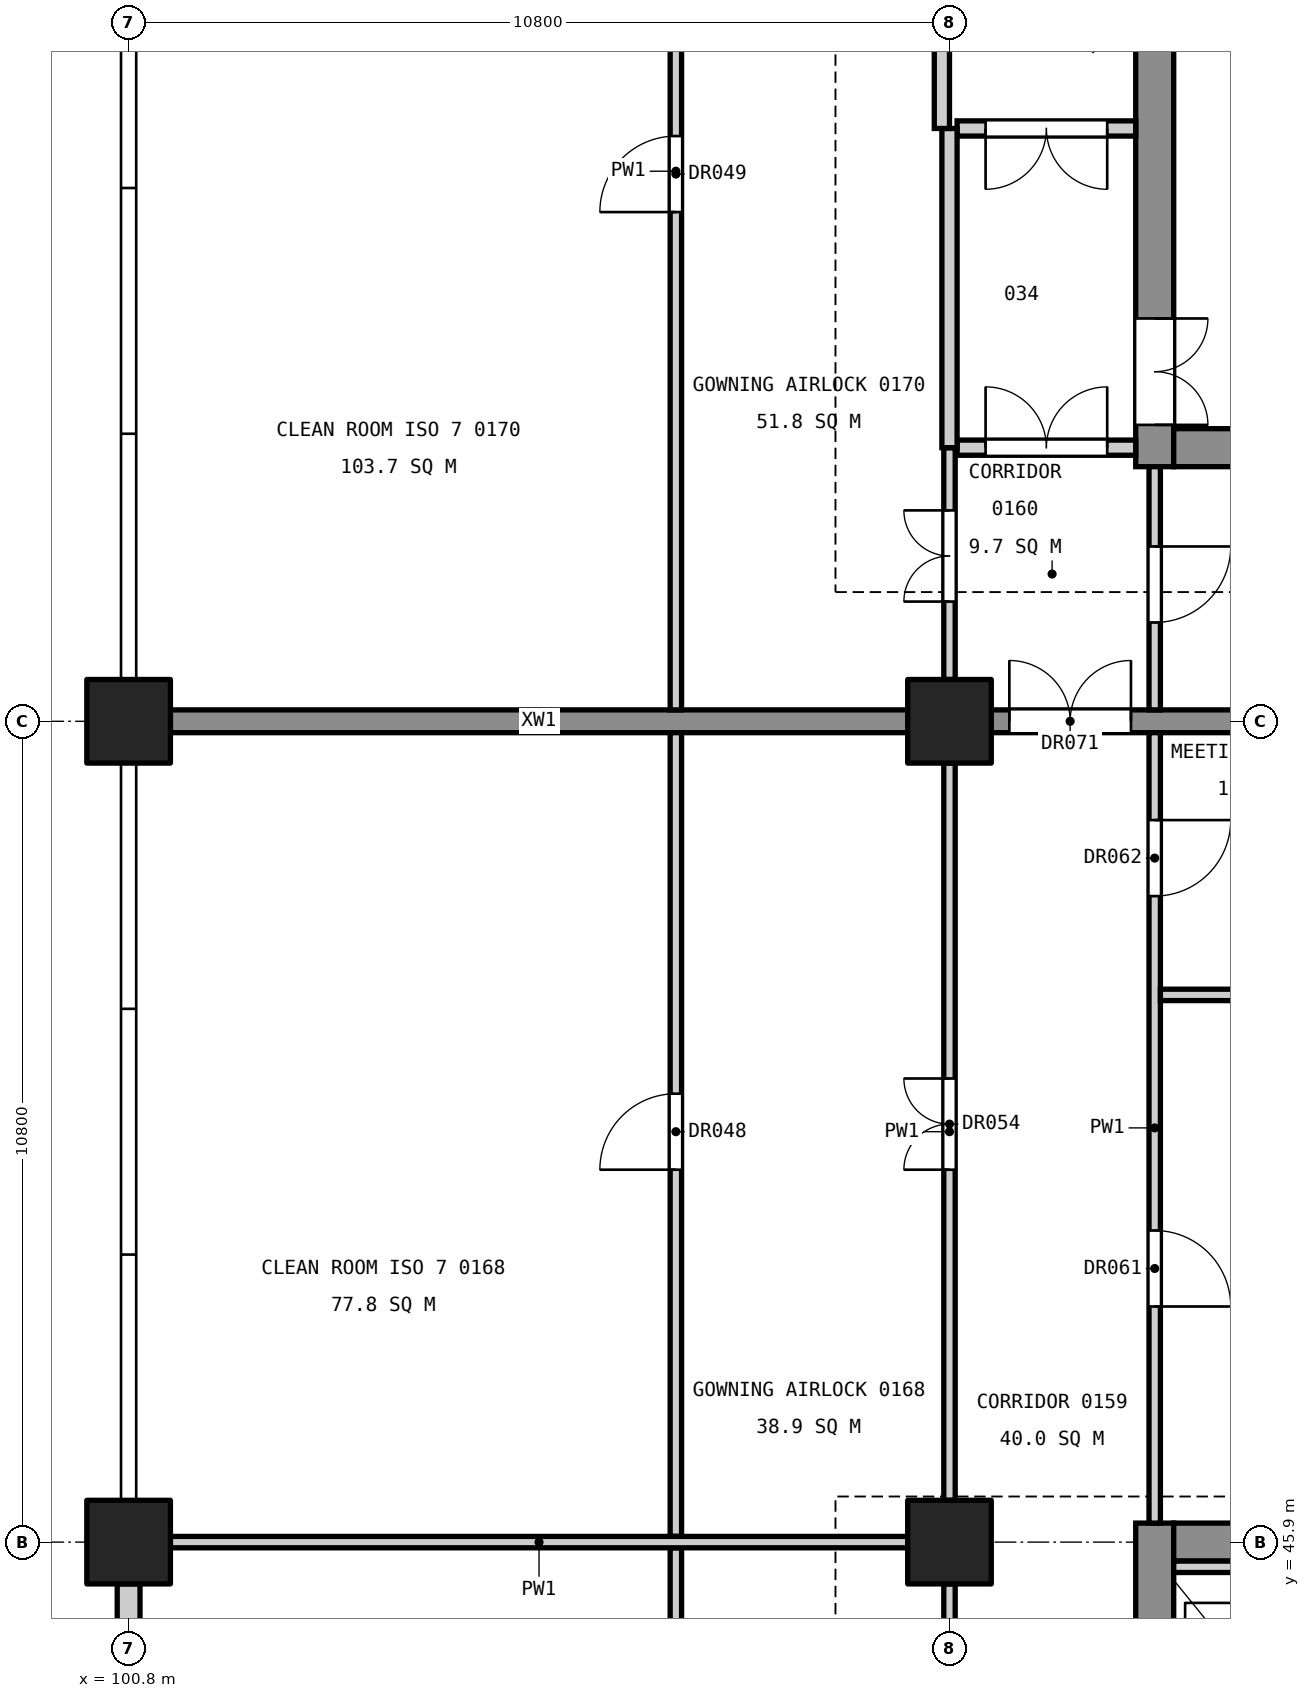
"""IFC4 building model, lengths in metres.
Left out: names, types, materials, properties, quantities, classifications, styles, units other than length and angle.
Written with IfcOpenShell. Run it as: python <this file> out.ifc"""

import sys

from ifc_helpers import new_model, si_unit, direction, frame, frame_2d, origin, origin_2d, place, context, subcontext, project, spatial, rectangle, extrude, element, fill, save


model = new_model("IFC4")
c1 = context("Model", 3, precision=1e-05, world=origin(), true_north=direction((0.0, 1.0)))
c2 = subcontext(c1, "Body", "Model", "MODEL_VIEW")
j1 = project(units=[si_unit("LENGTHUNIT", "METRE"), si_unit("PLANEANGLEUNIT", "RADIAN")], contexts=[c1])
p1 = place(None, origin())
s1 = spatial("IfcSite", under=j1, at=p1, CompositionType="ELEMENT")
p2 = place(p1, origin())
s2 = spatial("IfcBuilding", under=s1, at=p2, CompositionType="ELEMENT")
p3 = place(p2, frame((0.0, 0.0, 6.0)))
s3 = spatial("IfcBuildingStorey", under=s2, at=p3, CompositionType="ELEMENT", Elevation=6.0)
for number, where, z_axis, x_axis in (
    (1, (111.6, 45.9, 0.0), (0.0, 0.0, 1.0), (1.0, 0.0, 0.0)),
    (2, (111.6, 56.7, 0.0), (0.0, 0.0, 1.0), (1.0, 0.0, 0.0)),
    (3, (100.8, 45.9, 0.0), (0.0, 0.0, 1.0), (1.0, 0.0, 0.0)),
    (4, (100.8, 56.7, 0.0), (0.0, 0.0, 1.0), (1.0, 0.0, 0.0)),
):
    element("IfcColumn", number, at=place(p3, frame(where, z_axis=z_axis, x_axis=x_axis)), inside=s3, PredefinedType="COLUMN", context=c2, shape_type="SweptSolid", body=[
        extrude(rectangle(XDim=1.1, YDim=1.1, at=origin_2d()), origin(), (0.0, 0.0, 1.0), 5.4),
    ])
p4 = place(p3, frame((114.3, 34.85, 0.0), z_axis=(0.0, 0.0, 1.0), x_axis=(0.0, 1.0, 0.0)))
e5 = element("IfcWall", 5, at=p4, inside=s3, PredefinedType="SHEAR", context=c2, shape_type="SweptSolid", body=[
    extrude(rectangle(XDim=11.3, YDim=0.5, at=frame_2d((5.65, 0.0))), origin(), (0.0, 0.0, 1.0), 5.1),
])
p5 = place(p4, frame((0.55, 0.0, 0.0)))
e6 = element("IfcOpeningElement", 6, at=p5, cuts=e5, PredefinedType="OPENING", context=c2, shape_type="SweptSolid", body=[
    extrude(rectangle(XDim=1.4, YDim=2.1, at=frame_2d((0.7, 1.05))), frame((0.0, 0.26, 0.0), z_axis=(0.0, -1.0, 0.0), x_axis=(1.0, 0.0, 0.0)), (0.0, 0.0, 1.0), 0.52),
])
p6 = place(p4, frame((8.8, 0.0, 0.0)))
e7 = element("IfcOpeningElement", 7, at=p6, cuts=e5, PredefinedType="OPENING", context=c2, shape_type="SweptSolid", body=[
    extrude(rectangle(XDim=1.1, YDim=2.1, at=frame_2d((0.55, 1.05))), frame((0.0, 0.26, 0.0), z_axis=(0.0, -1.0, 0.0), x_axis=(1.0, 0.0, 0.0)), (0.0, 0.0, 1.0), 0.52),
])
p7 = place(p3, frame((118.55, 45.9, 0.0), z_axis=(0.0, 0.0, 1.0), x_axis=(-1.0, 0.0, 0.0)))
e8 = element("IfcWall", 8, at=p7, inside=s3, PredefinedType="SHEAR", context=c2, shape_type="SweptSolid", body=[
    extrude(rectangle(XDim=4.0, YDim=0.5, at=frame_2d((2.0, 0.0))), origin(), (0.0, 0.0, 1.0), 5.1),
])
p8 = place(p3, frame((114.3, 60.05, 0.0), z_axis=(0.0, 0.0, 1.0), x_axis=(0.0, 1.0, 0.0)))
e9 = element("IfcWall", 9, at=p8, inside=s3, PredefinedType="SHEAR", context=c2, shape_type="SweptSolid", body=[
    extrude(rectangle(XDim=14.9, YDim=0.5, at=frame_2d((7.45, 0.0))), origin(), (0.0, 0.0, 1.0), 5.1),
])
p9 = place(p8, frame((0.55, 0.0, 0.0)))
e10 = element("IfcOpeningElement", 10, at=p9, cuts=e9, PredefinedType="OPENING", context=c2, shape_type="SweptSolid", body=[
    extrude(rectangle(XDim=1.4, YDim=2.1, at=frame_2d((0.7, 1.05))), frame((0.0, 0.26, 0.0), z_axis=(0.0, -1.0, 0.0), x_axis=(1.0, 0.0, 0.0)), (0.0, 0.0, 1.0), 0.52),
])
p10 = place(p8, frame((8.85, 0.0, 0.0)))
e11 = element("IfcOpeningElement", 11, at=p10, cuts=e9, PredefinedType="OPENING", context=c2, shape_type="SweptSolid", body=[
    extrude(rectangle(XDim=1.1, YDim=2.1, at=frame_2d((0.55, 1.05))), frame((0.0, 0.26, 0.0), z_axis=(0.0, -1.0, 0.0), x_axis=(1.0, 0.0, 0.0)), (0.0, 0.0, 1.0), 0.52),
])
p11 = place(p8, frame((11.4, 0.0, 0.0)))
e12 = element("IfcOpeningElement", 12, at=p11, cuts=e9, PredefinedType="OPENING", context=c2, shape_type="SweptSolid", body=[
    extrude(rectangle(XDim=1.1, YDim=2.1, at=frame_2d((0.55, 1.05))), frame((0.0, 0.26, 0.0), z_axis=(0.0, -1.0, 0.0), x_axis=(1.0, 0.0, 0.0)), (0.0, 0.0, 1.0), 0.52),
])
p12 = place(p3, frame((118.55, 60.3, 0.0), z_axis=(0.0, 0.0, 1.0), x_axis=(-1.0, 0.0, 0.0)))
e13 = element("IfcWall", 13, at=p12, inside=s3, PredefinedType="SHEAR", context=c2, shape_type="SweptSolid", body=[
    extrude(rectangle(XDim=4.0, YDim=0.5, at=frame_2d((2.0, 0.0))), origin(), (0.0, 0.0, 1.0), 5.1),
])
p13 = place(p3, frame((118.25, 56.7, 0.0), z_axis=(0.0, 0.0, 1.0), x_axis=(-1.0, 0.0, 0.0)))
e14 = element("IfcWall", 14, at=p13, inside=s3, PredefinedType="SHEAR", context=c2, shape_type="SweptSolid", body=[
    extrude(rectangle(XDim=6.1, YDim=0.3, at=frame_2d((3.05, 0.0))), origin(), (0.0, 0.0, 1.0), 5.1),
])
p14 = place(p13, frame((4.262, 0.0, 0.0)))
e15 = element("IfcOpeningElement", 15, at=p14, cuts=e14, PredefinedType="OPENING", context=c2, shape_type="SweptSolid", body=[
    extrude(rectangle(XDim=1.6, YDim=2.1, at=frame_2d((0.8, 1.05))), frame((0.0, 0.16, 0.0), z_axis=(0.0, -1.0, 0.0), x_axis=(1.0, 0.0, 0.0)), (0.0, 0.0, 1.0), 0.32),
])
p15 = place(p3, frame((111.05, 56.7, 0.0), z_axis=(0.0, 0.0, 1.0), x_axis=(-1.0, 0.0, 0.0)))
e16 = element("IfcWall", 16, at=p15, inside=s3, PredefinedType="SHEAR", context=c2, shape_type="SweptSolid", body=[
    extrude(rectangle(XDim=9.7, YDim=0.3, at=frame_2d((4.85, 0.0))), origin(), (0.0, 0.0, 1.0), 5.1),
])
p16 = place(p3, frame((116.35, 45.575, 0.0), z_axis=(0.0, 0.0, 1.0), x_axis=(-1.0, 0.0, 0.0)))
e17 = element("IfcWall", 17, at=p16, inside=s3, PredefinedType="SOLIDWALL", context=c2, shape_type="SweptSolid", body=[
    extrude(rectangle(XDim=1.8, YDim=0.15, at=frame_2d((0.9, 0.0))), origin(), (0.0, 0.0, 1.0), 5.4),
])
p17 = place(p3, frame((100.8, 35.65, 0.0), z_axis=(0.0, 0.0, 1.0), x_axis=(0.0, 1.0, 0.0)))
e18 = element("IfcWall", 18, at=p17, inside=s3, PredefinedType="STANDARD", context=c2, shape_type="SweptSolid", body=[
    extrude(rectangle(XDim=9.7, YDim=0.3, at=frame_2d((4.85, 0.0))), origin(), (0.0, 0.0, 1.0), 4.0),
])
p18 = place(p3, frame((114.3, 46.15, 0.0), z_axis=(0.0, 0.0, 1.0), x_axis=(0.0, 1.0, 0.0)))
e19 = element("IfcWall", 19, at=p18, inside=s3, PredefinedType="PARTITIONING", context=c2, shape_type="SweptSolid", body=[
    extrude(rectangle(XDim=10.4, YDim=0.15, at=frame_2d((5.2, 0.0))), origin(), (0.0, 0.0, 1.0), 4.0),
])
p19 = place(p18, frame((2.85, 0.0, 0.0)))
e20 = element("IfcOpeningElement", 20, at=p19, cuts=e19, PredefinedType="OPENING", context=c2, shape_type="SweptSolid", body=[
    extrude(rectangle(XDim=1.0, YDim=2.1, at=frame_2d((0.5, 1.05))), frame((0.0, 0.085, 0.0), z_axis=(0.0, -1.0, 0.0), x_axis=(1.0, 0.0, 0.0)), (0.0, 0.0, 1.0), 0.17),
])
p20 = place(p18, frame((8.25, 0.0, 0.0)))
e21 = element("IfcOpeningElement", 21, at=p20, cuts=e19, PredefinedType="OPENING", context=c2, shape_type="SweptSolid", body=[
    extrude(rectangle(XDim=1.0, YDim=2.1, at=frame_2d((0.5, 1.05))), frame((0.0, 0.085, 0.0), z_axis=(0.0, -1.0, 0.0), x_axis=(1.0, 0.0, 0.0)), (0.0, 0.0, 1.0), 0.17),
])
p21 = place(p3, frame((114.3, 56.85, 0.0), z_axis=(0.0, 0.0, 1.0), x_axis=(0.0, 1.0, 0.0)))
e22 = element("IfcWall", 22, at=p21, inside=s3, PredefinedType="PARTITIONING", context=c2, shape_type="SweptSolid", body=[
    extrude(rectangle(XDim=3.2, YDim=0.15, at=frame_2d((1.6, 0.0))), origin(), (0.0, 0.0, 1.0), 4.0),
])
p22 = place(p21, frame((1.15, 0.0, 0.0)))
e23 = element("IfcOpeningElement", 23, at=p22, cuts=e22, PredefinedType="OPENING", context=c2, shape_type="SweptSolid", body=[
    extrude(rectangle(XDim=1.0, YDim=2.1, at=frame_2d((0.5, 1.05))), frame((0.0, 0.085, 0.0), z_axis=(0.0, -1.0, 0.0), x_axis=(1.0, 0.0, 0.0)), (0.0, 0.0, 1.0), 0.17),
])
p23 = place(p3, frame((118.65, 53.1, 0.0), z_axis=(0.0, 0.0, 1.0), x_axis=(-1.0, 0.0, 0.0)))
e24 = element("IfcWall", 24, at=p23, inside=s3, PredefinedType="PARTITIONING", context=c2, shape_type="SweptSolid", body=[
    extrude(rectangle(XDim=4.275, YDim=0.15, at=frame_2d((2.137, 0.0))), origin(), (0.0, 0.0, 1.0), 4.3),
])
p24 = place(p3, frame((114.05, 60.3, 0.0), z_axis=(0.0, 0.0, 1.0), x_axis=(-1.0, 0.0, 0.0)))
e25 = element("IfcWall", 25, at=p24, inside=s3, PredefinedType="PARTITIONING", context=c2, shape_type="SweptSolid", body=[
    extrude(rectangle(XDim=2.35, YDim=0.2, at=frame_2d((1.175, 0.0))), origin(), (0.0, 0.0, 1.0), 4.3),
])
p25 = place(p24, frame((0.375, 0.0, 0.0)))
e26 = element("IfcOpeningElement", 26, at=p25, cuts=e25, PredefinedType="OPENING", context=c2, shape_type="SweptSolid", body=[
    extrude(rectangle(XDim=1.6, YDim=2.1, at=frame_2d((0.8, 1.05))), frame((0.0, 0.11, 0.0), z_axis=(0.0, -1.0, 0.0), x_axis=(1.0, 0.0, 0.0)), (0.0, 0.0, 1.0), 0.22),
])
p26 = place(p3, frame((114.05, 64.5, 0.0), z_axis=(0.0, 0.0, 1.0), x_axis=(-1.0, 0.0, 0.0)))
e27 = element("IfcWall", 27, at=p26, inside=s3, PredefinedType="PARTITIONING", context=c2, shape_type="SweptSolid", body=[
    extrude(rectangle(XDim=2.35, YDim=0.2, at=frame_2d((1.175, 0.0))), origin(), (0.0, 0.0, 1.0), 4.0),
])
p27 = place(p26, frame((0.375, 0.0, 0.0)))
e28 = element("IfcOpeningElement", 28, at=p27, cuts=e27, PredefinedType="OPENING", context=c2, shape_type="SweptSolid", body=[
    extrude(rectangle(XDim=1.6, YDim=2.1, at=frame_2d((0.8, 1.05))), frame((0.0, 0.11, 0.0), z_axis=(0.0, -1.0, 0.0), x_axis=(1.0, 0.0, 0.0)), (0.0, 0.0, 1.0), 0.22),
])
p28 = place(p3, frame((111.6, 41.9, 0.0), z_axis=(0.0, 0.0, 1.0), x_axis=(0.0, 1.0, 0.0)))
e29 = element("IfcWall", 29, at=p28, inside=s3, PredefinedType="PARTITIONING", context=c2, shape_type="SweptSolid", body=[
    extrude(rectangle(XDim=3.45, YDim=0.15, at=frame_2d((1.725, 0.0))), origin(), (0.0, 0.0, 1.0), 4.0),
])
p29 = place(p28, frame((1.225, 0.0, 0.0)))
e30 = element("IfcOpeningElement", 30, at=p29, cuts=e29, PredefinedType="OPENING", context=c2, shape_type="SweptSolid", body=[
    extrude(rectangle(XDim=1.2, YDim=2.1, at=frame_2d((0.6, 1.05))), frame((0.0, 0.085, 0.0), z_axis=(0.0, -1.0, 0.0), x_axis=(1.0, 0.0, 0.0)), (0.0, 0.0, 1.0), 0.17),
])
p30 = place(p3, frame((111.6, 46.45, 0.0), z_axis=(0.0, 0.0, 1.0), x_axis=(0.0, 1.0, 0.0)))
e31 = element("IfcWall", 31, at=p30, inside=s3, PredefinedType="PARTITIONING", context=c2, shape_type="SweptSolid", body=[
    extrude(rectangle(XDim=9.7, YDim=0.15, at=frame_2d((4.85, 0.0))), origin(), (0.0, 0.0, 1.0), 4.0),
])
p31 = place(p30, frame((4.35, 0.0, 0.0)))
e32 = element("IfcOpeningElement", 32, at=p31, cuts=e31, PredefinedType="OPENING", context=c2, shape_type="SweptSolid", body=[
    extrude(rectangle(XDim=1.2, YDim=2.1, at=frame_2d((0.6, 1.05))), frame((0.0, 0.085, 0.0), z_axis=(0.0, -1.0, 0.0), x_axis=(1.0, 0.0, 0.0)), (0.0, 0.0, 1.0), 0.17),
])
p32 = place(p3, frame((111.6, 57.25, 0.0), z_axis=(0.0, 0.0, 1.0), x_axis=(0.0, 1.0, 0.0)))
e33 = element("IfcWall", 33, at=p32, inside=s3, PredefinedType="PARTITIONING", context=c2, shape_type="SweptSolid", body=[
    extrude(rectangle(XDim=3.05, YDim=0.15, at=frame_2d((1.525, 0.0))), origin(), (0.0, 0.0, 1.0), 4.0),
])
p33 = place(p32, frame((1.025, 0.0, 0.0)))
e34 = element("IfcOpeningElement", 34, at=p33, cuts=e33, PredefinedType="OPENING", context=c2, shape_type="SweptSolid", body=[
    extrude(rectangle(XDim=1.2, YDim=2.1, at=frame_2d((0.6, 1.05))), frame((0.0, 0.085, 0.0), z_axis=(0.0, -1.0, 0.0), x_axis=(1.0, 0.0, 0.0)), (0.0, 0.0, 1.0), 0.17),
])
p34 = place(p3, frame((111.6, 60.3, 0.0), z_axis=(0.0, 0.0, 1.0), x_axis=(0.0, 1.0, 0.0)))
e35 = element("IfcWall", 35, at=p34, inside=s3, PredefinedType="PARTITIONING", context=c2, shape_type="SweptSolid", body=[
    extrude(rectangle(XDim=4.2, YDim=0.2, at=frame_2d((2.1, 0.0))), origin(), (0.0, 0.0, 1.0), 4.0),
])
p35 = place(p3, frame((111.5, 64.5, 0.0), z_axis=(0.0, 0.0, 1.0), x_axis=(0.0, 1.0, 0.0)))
e36 = element("IfcWall", 36, at=p35, inside=s3, PredefinedType="PARTITIONING", context=c2, shape_type="SweptSolid", body=[
    extrude(rectangle(XDim=2.45, YDim=0.2, at=frame_2d((1.225, 0.0))), origin(), (0.0, 0.0, 1.0), 4.0),
])
p36 = place(p3, frame((108.0, 35.25, 0.0), z_axis=(0.0, 0.0, 1.0), x_axis=(0.0, 1.0, 0.0)))
e37 = element("IfcWall", 37, at=p36, inside=s3, PredefinedType="PARTITIONING", context=c2, shape_type="SweptSolid", body=[
    extrude(rectangle(XDim=10.575, YDim=0.15, at=frame_2d((5.288, 0.0))), origin(), (0.0, 0.0, 1.0), 4.0),
])
p37 = place(p36, frame((4.75, 0.0, 0.0)))
e38 = element("IfcOpeningElement", 38, at=p37, cuts=e37, PredefinedType="OPENING", context=c2, shape_type="SweptSolid", body=[
    extrude(rectangle(XDim=1.0, YDim=2.1, at=frame_2d((0.5, 1.05))), frame((0.0, 0.085, 0.0), z_axis=(0.0, -1.0, 0.0), x_axis=(1.0, 0.0, 0.0)), (0.0, 0.0, 1.0), 0.17),
])
p38 = place(p3, frame((108.0, 45.975, 0.0), z_axis=(0.0, 0.0, 1.0), x_axis=(0.0, 1.0, 0.0)))
e39 = element("IfcWall", 39, at=p38, inside=s3, PredefinedType="PARTITIONING", context=c2, shape_type="SweptSolid", body=[
    extrude(rectangle(XDim=10.575, YDim=0.15, at=frame_2d((5.288, 0.0))), origin(), (0.0, 0.0, 1.0), 4.0),
])
p39 = place(p38, frame((4.825, 0.0, 0.0)))
e40 = element("IfcOpeningElement", 40, at=p39, cuts=e39, PredefinedType="OPENING", context=c2, shape_type="SweptSolid", body=[
    extrude(rectangle(XDim=1.0, YDim=2.1, at=frame_2d((0.5, 1.05))), frame((0.0, 0.085, 0.0), z_axis=(0.0, -1.0, 0.0), x_axis=(1.0, 0.0, 0.0)), (0.0, 0.0, 1.0), 0.17),
])
p40 = place(p3, frame((108.0, 56.85, 0.0), z_axis=(0.0, 0.0, 1.0), x_axis=(0.0, 1.0, 0.0)))
e41 = element("IfcWall", 41, at=p40, inside=s3, PredefinedType="PARTITIONING", context=c2, shape_type="SweptSolid", body=[
    extrude(rectangle(XDim=14.175, YDim=0.15, at=frame_2d((7.087, 0.0))), origin(), (0.0, 0.0, 1.0), 4.0),
])
p41 = place(p40, frame((6.55, 0.0, 0.0)))
e42 = element("IfcOpeningElement", 42, at=p41, cuts=e41, PredefinedType="OPENING", context=c2, shape_type="SweptSolid", body=[
    extrude(rectangle(XDim=1.0, YDim=2.1, at=frame_2d((0.5, 1.05))), frame((0.0, 0.085, 0.0), z_axis=(0.0, -1.0, 0.0), x_axis=(1.0, 0.0, 0.0)), (0.0, 0.0, 1.0), 0.17),
])
p42 = place(p3, frame((111.05, 45.9, 0.0), z_axis=(0.0, 0.0, 1.0), x_axis=(-1.0, 0.0, 0.0)))
e43 = element("IfcWall", 43, at=p42, inside=s3, PredefinedType="PARTITIONING", context=c2, shape_type="SweptSolid", body=[
    extrude(rectangle(XDim=9.7, YDim=0.15, at=frame_2d((4.85, 0.0))), origin(), (0.0, 0.0, 1.0), 4.3),
])
p43 = place(p9, frame((1.4, 0.0, 0.0), z_axis=(0.0, 0.0, 1.0), x_axis=(-1.0, 0.0, 0.0)))
e44 = element("IfcDoor", 44, at=p43, inside=s3, OperationType="DOUBLE_DOOR_SINGLE_SWING", PredefinedType="DOOR", context=c2, shape_type="SweptSolid", body=[
    extrude(rectangle(XDim=1.4, YDim=2.1, at=frame_2d((0.7, 1.05))), frame((0.0, 0.025, 0.0), z_axis=(0.0, -1.0, 0.0), x_axis=(1.0, 0.0, 0.0)), (0.0, 0.0, 1.0), 0.05),
])
fill(e10, e44)
p44 = place(p39, origin())
e45 = element("IfcDoor", 45, at=p44, inside=s3, OperationType="SINGLE_SWING_LEFT", PredefinedType="DOOR", context=c2, shape_type="SweptSolid", body=[
    extrude(rectangle(XDim=1.0, YDim=2.1, at=frame_2d((0.5, 1.05))), frame((0.0, 0.025, 0.0), z_axis=(0.0, -1.0, 0.0), x_axis=(1.0, 0.0, 0.0)), (0.0, 0.0, 1.0), 0.05),
])
fill(e40, e45)
p45 = place(p41, origin())
e46 = element("IfcDoor", 46, at=p45, inside=s3, OperationType="SINGLE_SWING_LEFT", PredefinedType="DOOR", context=c2, shape_type="SweptSolid", body=[
    extrude(rectangle(XDim=1.0, YDim=2.1, at=frame_2d((0.5, 1.05))), frame((0.0, 0.025, 0.0), z_axis=(0.0, -1.0, 0.0), x_axis=(1.0, 0.0, 0.0)), (0.0, 0.0, 1.0), 0.05),
])
fill(e42, e46)
p46 = place(p31, origin())
e47 = element("IfcDoor", 47, at=p46, inside=s3, OperationType="DOUBLE_DOOR_SINGLE_SWING", PredefinedType="DOOR", context=c2, shape_type="SweptSolid", body=[
    extrude(rectangle(XDim=1.2, YDim=2.1, at=frame_2d((0.6, 1.05))), frame((0.0, 0.025, 0.0), z_axis=(0.0, -1.0, 0.0), x_axis=(1.0, 0.0, 0.0)), (0.0, 0.0, 1.0), 0.05),
])
fill(e32, e47)
p47 = place(p33, origin())
e48 = element("IfcDoor", 48, at=p47, inside=s3, OperationType="DOUBLE_DOOR_SINGLE_SWING", PredefinedType="DOOR", context=c2, shape_type="SweptSolid", body=[
    extrude(rectangle(XDim=1.2, YDim=2.1, at=frame_2d((0.6, 1.05))), frame((0.0, 0.025, 0.0), z_axis=(0.0, -1.0, 0.0), x_axis=(1.0, 0.0, 0.0)), (0.0, 0.0, 1.0), 0.05),
])
fill(e34, e48)
p48 = place(p19, frame((1.0, 0.0, 0.0), z_axis=(0.0, 0.0, 1.0), x_axis=(-1.0, 0.0, 0.0)))
e49 = element("IfcDoor", 49, at=p48, inside=s3, OperationType="SINGLE_SWING_RIGHT", PredefinedType="DOOR", context=c2, shape_type="SweptSolid", body=[
    extrude(rectangle(XDim=1.0, YDim=2.1, at=frame_2d((0.5, 1.05))), frame((0.0, 0.025, 0.0), z_axis=(0.0, -1.0, 0.0), x_axis=(1.0, 0.0, 0.0)), (0.0, 0.0, 1.0), 0.05),
])
fill(e20, e49)
p49 = place(p20, frame((1.0, 0.0, 0.0), z_axis=(0.0, 0.0, 1.0), x_axis=(-1.0, 0.0, 0.0)))
e50 = element("IfcDoor", 50, at=p49, inside=s3, OperationType="SINGLE_SWING_LEFT", PredefinedType="DOOR", context=c2, shape_type="SweptSolid", body=[
    extrude(rectangle(XDim=1.0, YDim=2.1, at=frame_2d((0.5, 1.05))), frame((0.0, 0.025, 0.0), z_axis=(0.0, -1.0, 0.0), x_axis=(1.0, 0.0, 0.0)), (0.0, 0.0, 1.0), 0.05),
])
fill(e21, e50)
p50 = place(p22, frame((1.0, 0.0, 0.0), z_axis=(0.0, 0.0, 1.0), x_axis=(-1.0, 0.0, 0.0)))
e51 = element("IfcDoor", 51, at=p50, inside=s3, OperationType="SINGLE_SWING_LEFT", PredefinedType="DOOR", context=c2, shape_type="SweptSolid", body=[
    extrude(rectangle(XDim=1.0, YDim=2.1, at=frame_2d((0.5, 1.05))), frame((0.0, 0.025, 0.0), z_axis=(0.0, -1.0, 0.0), x_axis=(1.0, 0.0, 0.0)), (0.0, 0.0, 1.0), 0.05),
])
fill(e23, e51)
p51 = place(p25, frame((1.6, 0.0, 0.0), z_axis=(0.0, 0.0, 1.0), x_axis=(-1.0, 0.0, 0.0)))
e52 = element("IfcDoor", 52, at=p51, inside=s3, OperationType="DOUBLE_DOOR_SINGLE_SWING", PredefinedType="DOOR", context=c2, shape_type="SweptSolid", body=[
    extrude(rectangle(XDim=1.6, YDim=2.1, at=frame_2d((0.8, 1.05))), frame((0.0, 0.025, 0.0), z_axis=(0.0, -1.0, 0.0), x_axis=(1.0, 0.0, 0.0)), (0.0, 0.0, 1.0), 0.05),
])
fill(e26, e52)
p52 = place(p27, origin())
e53 = element("IfcDoor", 53, at=p52, inside=s3, OperationType="DOUBLE_DOOR_SINGLE_SWING", PredefinedType="DOOR", context=c2, shape_type="SweptSolid", body=[
    extrude(rectangle(XDim=1.6, YDim=2.1, at=frame_2d((0.8, 1.05))), frame((0.0, 0.025, 0.0), z_axis=(0.0, -1.0, 0.0), x_axis=(1.0, 0.0, 0.0)), (0.0, 0.0, 1.0), 0.05),
])
fill(e28, e53)
p53 = place(p14, frame((1.6, 0.0, 0.0), z_axis=(0.0, 0.0, 1.0), x_axis=(-1.0, 0.0, 0.0)))
e54 = element("IfcDoor", 54, at=p53, inside=s3, OperationType="DOUBLE_DOOR_SINGLE_SWING", PredefinedType="DOOR", context=c2, shape_type="SweptSolid", body=[
    extrude(rectangle(XDim=1.6, YDim=2.1, at=frame_2d((0.8, 1.05))), frame((0.0, 0.025, 0.0), z_axis=(0.0, -1.0, 0.0), x_axis=(1.0, 0.0, 0.0)), (0.0, 0.0, 1.0), 0.05),
])
fill(e15, e54)
save(model, sys.argv[1])
